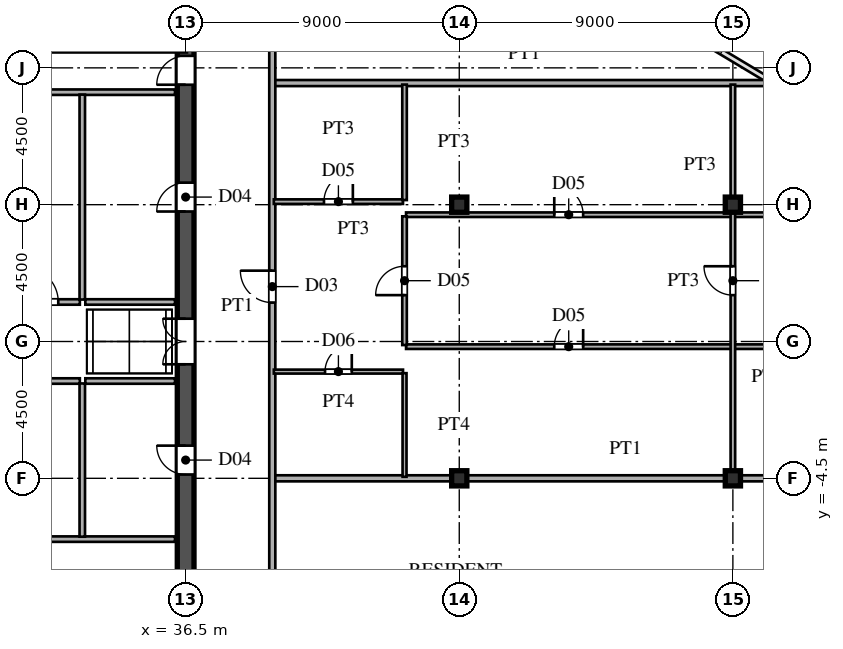
"""IFC4 building model, lengths in metres.
Left out: names, types, materials, properties, quantities, classifications, styles, units other than length and angle.
Written with IfcOpenShell. Run it as: python <this file> out.ifc"""

import sys

from ifc_helpers import new_model, si_unit, direction, frame, frame_2d, origin, origin_2d, place, context, subcontext, project, spatial, rectangle, i_section, extrude, source, transform, mapped, element, fill, save


model = new_model("IFC4")
c1 = context("Model", 3, precision=1e-05, world=origin(), true_north=direction((0.0, 1.0)))
c2 = subcontext(c1, "Body", "Model", "MODEL_VIEW")
j1 = project(units=[si_unit("LENGTHUNIT", "METRE"), si_unit("PLANEANGLEUNIT", "RADIAN")], contexts=[c1])
p1 = place(None, origin())
s1 = spatial("IfcSite", under=j1, at=p1, CompositionType="ELEMENT")
p2 = place(p1, origin())
s2 = spatial("IfcBuilding", under=s1, at=p2, CompositionType="ELEMENT")
p3 = place(p2, frame((0.0, 0.0, 203.1)))
s3 = spatial("IfcBuildingStorey", under=s2, at=p3, CompositionType="ELEMENT", Elevation=203.1)
m1 = source(origin(), c2, "Body", "SweptSolid", [
    extrude(i_section(OverallWidth=0.5, OverallDepth=0.5, WebThickness=0.02, FlangeThickness=0.032, at=origin_2d()), origin(), (0.0, 0.0, 1.0), 3.6),
])
for number, where, z_axis, x_axis in (
    (1, (45.5, -4.5, 0.0), (0.0, 0.0, 1.0), (1.0, 0.0, 0.0)),
    (2, (45.5, 4.5, 0.0), (0.0, 0.0, 1.0), (1.0, 0.0, 0.0)),
    (3, (54.5, -4.5, 0.0), (0.0, 0.0, 1.0), (1.0, 0.0, 0.0)),
    (4, (54.5, 4.5, 0.0), (0.0, 0.0, 1.0), (1.0, 0.0, 0.0)),
):
    element("IfcColumn", number, at=place(p3, frame(where, z_axis=z_axis, x_axis=x_axis)), inside=s3, PredefinedType="COLUMN", context=c2, shape_type="MappedRepresentation", body=[
        mapped(m1, transform((0.0, 0.0, 0.0), scale=1.0)),
    ])
p4 = place(p3, frame((36.5, -13.65, 0.0), z_axis=(0.0, 0.0, 1.0), x_axis=(0.0, 1.0, 0.0)))
e5 = element("IfcWall", 5, at=p4, inside=s3, PredefinedType="SHEAR", context=c2, shape_type="SweptSolid", body=[
    extrude(rectangle(XDim=7.15, YDim=0.55, at=frame_2d((3.575, 0.0))), origin(), (0.0, 0.0, 1.0), 3.38),
])
p5 = place(p4, frame((4.675, 0.0, 0.0)))
e6 = element("IfcOpeningElement", 6, at=p5, cuts=e5, PredefinedType="OPENING", context=c2, shape_type="SweptSolid", body=[
    extrude(rectangle(XDim=1.15, YDim=2.2, at=frame_2d((0.575, 1.1))), frame((0.0, 0.285, 0.0), z_axis=(0.0, -1.0, 0.0), x_axis=(1.0, 0.0, 0.0)), (0.0, 0.0, 1.0), 0.57),
])
p6 = place(p3, frame((36.5, -1.3, 0.0), z_axis=(0.0, 0.0, 1.0), x_axis=(0.0, 1.0, 0.0)))
e7 = element("IfcWall", 7, at=p6, inside=s3, PredefinedType="SHEAR", context=c2, shape_type="SweptSolid", body=[
    extrude(rectangle(XDim=2.6, YDim=0.55, at=frame_2d((1.3, 0.0))), origin(), (0.0, 0.0, 1.0), 3.38),
])
p7 = place(p6, frame((0.55, 0.0, 0.0)))
e8 = element("IfcOpeningElement", 8, at=p7, cuts=e7, PredefinedType="OPENING", context=c2, shape_type="SweptSolid", body=[
    extrude(rectangle(XDim=1.5, YDim=2.3, at=frame_2d((0.75, 1.15))), frame((0.0, 0.285, 0.0), z_axis=(0.0, -1.0, 0.0), x_axis=(1.0, 0.0, 0.0)), (0.0, 0.0, 1.0), 0.57),
])
p8 = place(p3, frame((36.5, 8.2, 0.0), z_axis=(0.0, 0.0, 1.0), x_axis=(0.0, 1.0, 0.0)))
e9 = element("IfcWall", 9, at=p8, inside=s3, PredefinedType="SHEAR", context=c2, shape_type="SweptSolid", body=[
    extrude(rectangle(XDim=5.45, YDim=0.55, at=frame_2d((2.725, 0.0))), origin(), (0.0, 0.0, 1.0), 3.38),
])
p9 = place(p8, frame((0.245, 0.0, 0.0)))
e10 = element("IfcOpeningElement", 10, at=p9, cuts=e9, PredefinedType="OPENING", context=c2, shape_type="SweptSolid", body=[
    extrude(rectangle(XDim=0.95, YDim=2.15, at=frame_2d((0.475, 1.075))), frame((0.0, 0.285, 0.0), z_axis=(0.0, -1.0, 0.0), x_axis=(1.0, 0.0, 0.0)), (0.0, 0.0, 1.0), 0.57),
])
p10 = place(p3, frame((36.5, -6.5, 0.0), z_axis=(0.0, 0.0, 1.0), x_axis=(0.0, 1.0, 0.0)))
e11 = element("IfcWall", 11, at=p10, inside=s3, PredefinedType="SHEAR", context=c2, shape_type="SweptSolid", body=[
    extrude(rectangle(XDim=5.2, YDim=0.55, at=frame_2d((2.6, 0.0))), origin(), (0.0, 0.0, 1.0), 3.38),
])
p11 = place(p10, frame((2.125, 0.0, 0.0)))
e12 = element("IfcOpeningElement", 12, at=p11, cuts=e11, PredefinedType="OPENING", context=c2, shape_type="SweptSolid", body=[
    extrude(rectangle(XDim=0.95, YDim=2.15, at=frame_2d((0.475, 1.075))), frame((0.0, 0.285, 0.0), z_axis=(0.0, -1.0, 0.0), x_axis=(1.0, 0.0, 0.0)), (0.0, 0.0, 1.0), 0.57),
])
p12 = place(p3, frame((36.5, 1.3, 0.0), z_axis=(0.0, 0.0, 1.0), x_axis=(0.0, 1.0, 0.0)))
e13 = element("IfcWall", 13, at=p12, inside=s3, PredefinedType="SHEAR", context=c2, shape_type="SweptSolid", body=[
    extrude(rectangle(XDim=6.9, YDim=0.55, at=frame_2d((3.45, 0.0))), origin(), (0.0, 0.0, 1.0), 3.38),
])
p13 = place(p12, frame((2.975, 0.0, 0.0)))
e14 = element("IfcOpeningElement", 14, at=p13, cuts=e13, PredefinedType="OPENING", context=c2, shape_type="SweptSolid", body=[
    extrude(rectangle(XDim=0.95, YDim=2.15, at=frame_2d((0.475, 1.075))), frame((0.0, 0.285, 0.0), z_axis=(0.0, -1.0, 0.0), x_axis=(1.0, 0.0, 0.0)), (0.0, 0.0, 1.0), 0.57),
])
for number, where, z_axis, x_axis in (
    (15, (30.45, -6.5, 0.0), (0.0, 0.0, 1.0), (1.0, 0.0, 0.0)),
    (16, (30.45, 8.2, 0.0), (0.0, 0.0, 1.0), (1.0, 0.0, 0.0)),
):
    element("IfcWall", number, at=place(p3, frame(where, z_axis=z_axis, x_axis=x_axis)), inside=s3, PredefinedType="PARTITIONING", context=c2, shape_type="SweptSolid", body=[
        extrude(rectangle(XDim=5.7, YDim=0.18, at=frame_2d((2.85, 0.0))), origin(), (0.0, 0.0, 1.0), 3.38),
    ])
p14 = place(p3, frame((33.1, -6.42, 0.0), z_axis=(0.0, 0.0, 1.0), x_axis=(0.0, 1.0, 0.0)))
e17 = element("IfcWall", 17, at=p14, inside=s3, PredefinedType="PARTITIONING", context=c2, shape_type="SweptSolid", body=[
    extrude(rectangle(XDim=5.04, YDim=0.18, at=frame_2d((2.52, 0.0))), origin(), (0.0, 0.0, 1.0), 3.38),
])
p15 = place(p3, frame((33.1, 1.38, 0.0), z_axis=(0.0, 0.0, 1.0), x_axis=(0.0, 1.0, 0.0)))
e18 = element("IfcWall", 18, at=p15, inside=s3, PredefinedType="PARTITIONING", context=c2, shape_type="SweptSolid", body=[
    extrude(rectangle(XDim=6.74, YDim=0.18, at=frame_2d((3.37, 0.0))), origin(), (0.0, 0.0, 1.0), 3.38),
])
p16 = place(p3, frame((27.85, -1.3, 0.0), z_axis=(0.0, 0.0, 1.0), x_axis=(1.0, 0.0, 0.0)))
e19 = element("IfcWall", 19, at=p16, inside=s3, PredefinedType="PARTITIONING", context=c2, shape_type="SweptSolid", body=[
    extrude(rectangle(XDim=5.17, YDim=0.18, at=frame_2d((2.585, 0.0))), origin(), (0.0, 0.0, 1.0), 3.38),
])
p17 = place(p16, frame((2.01, 0.0, 0.0)))
e20 = element("IfcOpeningElement", 20, at=p17, cuts=e19, PredefinedType="OPENING", context=c2, shape_type="SweptSolid", body=[
    extrude(rectangle(XDim=1.15, YDim=2.2, at=frame_2d((0.575, 1.1))), frame((0.0, 0.1, 0.0), z_axis=(0.0, -1.0, 0.0), x_axis=(1.0, 0.0, 0.0)), (0.0, 0.0, 1.0), 0.2),
])
p18 = place(p3, frame((30.45, 1.3, 0.0), z_axis=(0.0, 0.0, 1.0), x_axis=(1.0, 0.0, 0.0)))
e21 = element("IfcWall", 21, at=p18, inside=s3, PredefinedType="PARTITIONING", context=c2, shape_type="SweptSolid", body=[
    extrude(rectangle(XDim=2.57, YDim=0.18, at=frame_2d((1.285, 0.0))), origin(), (0.0, 0.0, 1.0), 3.38),
])
p19 = place(p18, frame((0.71, 0.0, 0.0)))
e22 = element("IfcOpeningElement", 22, at=p19, cuts=e21, PredefinedType="OPENING", context=c2, shape_type="SweptSolid", body=[
    extrude(rectangle(XDim=1.15, YDim=2.2, at=frame_2d((0.575, 1.1))), frame((0.0, 0.1, 0.0), z_axis=(0.0, -1.0, 0.0), x_axis=(1.0, 0.0, 0.0)), (0.0, 0.0, 1.0), 0.2),
])
for number, where, z_axis, x_axis in (
    (23, (33.2, -1.3, 0.0), (0.0, 0.0, 1.0), (1.0, 0.0, 0.0)),
    (24, (33.2, 1.3, 0.0), (0.0, 0.0, 1.0), (1.0, 0.0, 0.0)),
):
    element("IfcWall", number, at=place(p3, frame(where, z_axis=z_axis, x_axis=x_axis)), inside=s3, PredefinedType="PARTITIONING", context=c2, shape_type="SweptSolid", body=[
        extrude(rectangle(XDim=2.95, YDim=0.18, at=frame_2d((1.475, 0.0))), origin(), (0.0, 0.0, 1.0), 3.38),
    ])
p20 = place(p3, frame((39.43, -4.5, 0.0), z_axis=(0.0, 0.0, 1.0), x_axis=(1.0, 0.0, 0.0)))
e25 = element("IfcWall", 25, at=p20, inside=s3, PredefinedType="PARTITIONING", context=c2, shape_type="SweptSolid", body=[
    extrude(rectangle(XDim=15.09, YDim=0.2, at=frame_2d((7.545, 0.0))), origin(), (0.0, 0.0, 1.0), 2.78),
])
p21 = place(p3, frame((54.52, -4.5, 0.0), z_axis=(0.0, 0.0, 1.0), x_axis=(1.0, 0.0, 0.0)))
e26 = element("IfcWall", 26, at=p21, inside=s3, PredefinedType="PARTITIONING", context=c2, shape_type="SweptSolid", body=[
    extrude(rectangle(XDim=7.99, YDim=0.2, at=frame_2d((3.995, 0.0))), origin(), (0.0, 0.0, 1.0), 3.38),
])
p22 = place(p3, frame((39.4, -0.99, 0.0), z_axis=(0.0, 0.0, 1.0), x_axis=(1.0, 0.0, 0.0)))
e27 = element("IfcWall", 27, at=p22, inside=s3, PredefinedType="PARTITIONING", context=c2, shape_type="SweptSolid", body=[
    extrude(rectangle(XDim=4.25, YDim=0.13, at=frame_2d((2.125, 0.0))), origin(), (0.0, 0.0, 1.0), 3.38),
])
p23 = place(p22, frame((1.685, 0.0, 0.0)))
e28 = element("IfcOpeningElement", 28, at=p23, cuts=e27, PredefinedType="OPENING", context=c2, shape_type="SweptSolid", body=[
    extrude(rectangle(XDim=0.88, YDim=2.1, at=frame_2d((0.44, 1.05))), frame((0.0, 0.075, 0.0), z_axis=(0.0, -1.0, 0.0), x_axis=(1.0, 0.0, 0.0)), (0.0, 0.0, 1.0), 0.15),
])
p24 = place(p3, frame((43.75, -0.17, 0.0), z_axis=(0.0, 0.0, 1.0), x_axis=(1.0, 0.0, 0.0)))
e29 = element("IfcWall", 29, at=p24, inside=s3, PredefinedType="PARTITIONING", context=c2, shape_type="SweptSolid", body=[
    extrude(rectangle(XDim=23.785, YDim=0.15, at=frame_2d((11.893, 0.0))), origin(), (0.0, 0.0, 1.0), 3.38),
])
p25 = place(p24, frame((4.875, 0.0, 0.0)))
e30 = element("IfcOpeningElement", 30, at=p25, cuts=e29, PredefinedType="OPENING", context=c2, shape_type="SweptSolid", body=[
    extrude(rectangle(XDim=0.95, YDim=2.15, at=frame_2d((0.475, 1.075))), frame((0.0, 0.085, 0.0), z_axis=(0.0, -1.0, 0.0), x_axis=(1.0, 0.0, 0.0)), (0.0, 0.0, 1.0), 0.17),
])
p26 = place(p24, frame((16.775, 0.0, 0.0)))
e31 = element("IfcOpeningElement", 31, at=p26, cuts=e29, PredefinedType="OPENING", context=c2, shape_type="SweptSolid", body=[
    extrude(rectangle(XDim=0.95, YDim=2.15, at=frame_2d((0.475, 1.075))), frame((0.0, 0.085, 0.0), z_axis=(0.0, -1.0, 0.0), x_axis=(1.0, 0.0, 0.0)), (0.0, 0.0, 1.0), 0.17),
])
p27 = place(p3, frame((43.75, 4.17, 0.0), z_axis=(0.0, 0.0, 1.0), x_axis=(1.0, 0.0, 0.0)))
e32 = element("IfcWall", 32, at=p27, inside=s3, PredefinedType="PARTITIONING", context=c2, shape_type="SweptSolid", body=[
    extrude(rectangle(XDim=19.34, YDim=0.15, at=frame_2d((9.67, 0.0))), origin(), (0.0, 0.0, 1.0), 3.38),
])
p28 = place(p27, frame((4.875, 0.0, 0.0)))
e33 = element("IfcOpeningElement", 33, at=p28, cuts=e32, PredefinedType="OPENING", context=c2, shape_type="SweptSolid", body=[
    extrude(rectangle(XDim=0.95, YDim=2.15, at=frame_2d((0.475, 1.075))), frame((0.0, 0.085, 0.0), z_axis=(0.0, -1.0, 0.0), x_axis=(1.0, 0.0, 0.0)), (0.0, 0.0, 1.0), 0.17),
])
p29 = place(p27, frame((14.553, 0.0, 0.0)))
e34 = element("IfcOpeningElement", 34, at=p29, cuts=e32, PredefinedType="OPENING", context=c2, shape_type="SweptSolid", body=[
    extrude(rectangle(XDim=0.95, YDim=2.15, at=frame_2d((0.475, 1.075))), frame((0.0, 0.085, 0.0), z_axis=(0.0, -1.0, 0.0), x_axis=(1.0, 0.0, 0.0)), (0.0, 0.0, 1.0), 0.17),
])
p30 = place(p3, frame((39.4, 4.6, 0.0), z_axis=(0.0, 0.0, 1.0), x_axis=(1.0, 0.0, 0.0)))
e35 = element("IfcWall", 35, at=p30, inside=s3, PredefinedType="PARTITIONING", context=c2, shape_type="SweptSolid", body=[
    extrude(rectangle(XDim=4.25, YDim=0.15, at=frame_2d((2.125, 0.0))), origin(), (0.0, 0.0, 1.0), 2.78),
])
p31 = place(p30, frame((1.65, 0.0, 0.0)))
e36 = element("IfcOpeningElement", 36, at=p31, cuts=e35, PredefinedType="OPENING", context=c2, shape_type="SweptSolid", body=[
    extrude(rectangle(XDim=0.95, YDim=2.15, at=frame_2d((0.475, 1.075))), frame((0.0, 0.085, 0.0), z_axis=(0.0, -1.0, 0.0), x_axis=(1.0, 0.0, 0.0)), (0.0, 0.0, 1.0), 0.17),
])
p32 = place(p3, frame((39.43, 8.5, 0.0), z_axis=(0.0, 0.0, 1.0), x_axis=(1.0, 0.0, 0.0)))
e37 = element("IfcWall", 37, at=p32, inside=s3, PredefinedType="PARTITIONING", context=c2, shape_type="SweptSolid", body=[
    extrude(rectangle(XDim=16.413, YDim=0.2, at=frame_2d((8.207, 0.0))), origin(), (0.0, 0.0, 1.0), 3.38),
])
p33 = place(p3, frame((39.35, -15.715, 0.0), z_axis=(0.0, 0.0, 1.0), x_axis=(0.0, 1.0, 0.0)))
e38 = element("IfcWall", 38, at=p33, inside=s3, PredefinedType="PARTITIONING", context=c2, shape_type="SweptSolid", body=[
    extrude(rectangle(XDim=31.43, YDim=0.2, at=frame_2d((15.715, 0.0))), origin(), (0.0, 0.0, 1.0), 3.38),
])
p34 = place(p33, frame((5.04, 0.0, 0.0)))
e39 = element("IfcOpeningElement", 39, at=p34, cuts=e38, PredefinedType="OPENING", context=c2, shape_type="SweptSolid", body=[
    extrude(rectangle(XDim=1.05, YDim=2.25, at=frame_2d((0.525, 1.125))), frame((0.0, 0.11, 0.0), z_axis=(0.0, -1.0, 0.0), x_axis=(1.0, 0.0, 0.0)), (0.0, 0.0, 1.0), 0.22),
])
p35 = place(p33, frame((16.995, 0.0, 0.0)))
e40 = element("IfcOpeningElement", 40, at=p35, cuts=e38, PredefinedType="OPENING", context=c2, shape_type="SweptSolid", body=[
    extrude(rectangle(XDim=1.05, YDim=2.25, at=frame_2d((0.525, 1.125))), frame((0.0, 0.11, 0.0), z_axis=(0.0, -1.0, 0.0), x_axis=(1.0, 0.0, 0.0)), (0.0, 0.0, 1.0), 0.22),
])
p36 = place(p33, frame((27.34, 0.0, 0.0)))
e41 = element("IfcOpeningElement", 41, at=p36, cuts=e38, PredefinedType="OPENING", context=c2, shape_type="SweptSolid", body=[
    extrude(rectangle(XDim=1.05, YDim=2.25, at=frame_2d((0.525, 1.125))), frame((0.0, 0.11, 0.0), z_axis=(0.0, -1.0, 0.0), x_axis=(1.0, 0.0, 0.0)), (0.0, 0.0, 1.0), 0.22),
])
p37 = place(p3, frame((43.7, -4.45, 0.0), z_axis=(0.0, 0.0, 1.0), x_axis=(0.0, 1.0, 0.0)))
e42 = element("IfcWall", 42, at=p37, inside=s3, PredefinedType="PARTITIONING", context=c2, shape_type="SweptSolid", body=[
    extrude(rectangle(XDim=3.408, YDim=0.13, at=frame_2d((1.704, 0.0))), origin(), (0.0, 0.0, 1.0), 3.38),
])
p38 = place(p3, frame((43.7, -0.117, 0.0), z_axis=(0.0, 0.0, 1.0), x_axis=(0.0, 1.0, 0.0)))
e43 = element("IfcWall", 43, at=p38, inside=s3, PredefinedType="PARTITIONING", context=c2, shape_type="SweptSolid", body=[
    extrude(rectangle(XDim=4.234, YDim=0.15, at=frame_2d((2.117, 0.0))), origin(), (0.0, 0.0, 1.0), 3.38),
])
p39 = place(p38, frame((1.642, 0.0, 0.0)))
e44 = element("IfcOpeningElement", 44, at=p39, cuts=e43, PredefinedType="OPENING", context=c2, shape_type="SweptSolid", body=[
    extrude(rectangle(XDim=0.95, YDim=2.15, at=frame_2d((0.475, 1.075))), frame((0.0, 0.085, 0.0), z_axis=(0.0, -1.0, 0.0), x_axis=(1.0, 0.0, 0.0)), (0.0, 0.0, 1.0), 0.17),
])
p40 = place(p3, frame((43.7, 4.652, 0.0), z_axis=(0.0, 0.0, 1.0), x_axis=(0.0, 1.0, 0.0)))
e45 = element("IfcWall", 45, at=p40, inside=s3, PredefinedType="PARTITIONING", context=c2, shape_type="SweptSolid", body=[
    extrude(rectangle(XDim=3.798, YDim=0.15, at=frame_2d((1.899, 0.0))), origin(), (0.0, 0.0, 1.0), 3.38),
])
p41 = place(p3, frame((54.5, -4.45, 0.0), z_axis=(0.0, 0.0, 1.0), x_axis=(0.0, 1.0, 0.0)))
e46 = element("IfcWall", 46, at=p41, inside=s3, PredefinedType="PARTITIONING", context=c2, shape_type="SweptSolid", body=[
    extrude(rectangle(XDim=12.9, YDim=0.15, at=frame_2d((6.45, 0.0))), origin(), (0.0, 0.0, 1.0), 2.78),
])
p42 = place(p41, frame((5.975, 0.0, 0.0)))
e47 = element("IfcOpeningElement", 47, at=p42, cuts=e46, PredefinedType="OPENING", context=c2, shape_type="SweptSolid", body=[
    extrude(rectangle(XDim=0.95, YDim=2.15, at=frame_2d((0.475, 1.075))), frame((0.0, 0.085, 0.0), z_axis=(0.0, -1.0, 0.0), x_axis=(1.0, 0.0, 0.0)), (0.0, 0.0, 1.0), 0.17),
])
m2 = source(origin(), c2, "Body", "SweptSolid", [
    extrude(rectangle(XDim=1.5, YDim=2.3, at=frame_2d((0.75, 1.15))), frame((0.0, 0.025, 0.0), z_axis=(0.0, -1.0, 0.0), x_axis=(1.0, 0.0, 0.0)), (0.0, 0.0, 1.0), 0.05),
])
p43 = place(p7, origin())
e48 = element("IfcDoor", 48, at=p43, inside=s3, OperationType="DOUBLE_SWING_LEFT", PredefinedType="DOOR", context=c2, shape_type="MappedRepresentation", body=[
    mapped(m2, transform((0.0, 0.0, 0.0), scale=1.0)),
])
fill(e8, e48)
m3 = source(origin(), c2, "Body", "SweptSolid", [
    extrude(rectangle(XDim=0.95, YDim=2.15, at=frame_2d((0.475, 1.075))), frame((0.0, 0.025, 0.0), z_axis=(0.0, -1.0, 0.0), x_axis=(1.0, 0.0, 0.0)), (0.0, 0.0, 1.0), 0.05),
])
p44 = place(p9, origin())
e49 = element("IfcDoor", 49, at=p44, inside=s3, OperationType="SINGLE_SWING_LEFT", PredefinedType="DOOR", context=c2, shape_type="MappedRepresentation", body=[
    mapped(m3, transform((0.0, 0.0, 0.0), scale=1.0)),
])
fill(e10, e49)
p45 = place(p11, origin())
e50 = element("IfcDoor", 50, at=p45, inside=s3, OperationType="SINGLE_SWING_RIGHT", PredefinedType="DOOR", context=c2, shape_type="MappedRepresentation", body=[
    mapped(m3, transform((0.0, 0.0, 0.0), scale=1.0)),
])
fill(e12, e50)
p46 = place(p13, origin())
e51 = element("IfcDoor", 51, at=p46, inside=s3, OperationType="SINGLE_SWING_LEFT", PredefinedType="DOOR", context=c2, shape_type="MappedRepresentation", body=[
    mapped(m3, transform((0.0, 0.0, 0.0), scale=1.0)),
])
fill(e14, e51)
m4 = source(origin(), c2, "Body", "SweptSolid", [
    extrude(rectangle(XDim=1.15, YDim=2.2, at=frame_2d((0.575, 1.1))), frame((0.0, 0.025, 0.0), z_axis=(0.0, -1.0, 0.0), x_axis=(1.0, 0.0, 0.0)), (0.0, 0.0, 1.0), 0.05),
])
p47 = place(p19, origin())
e52 = element("IfcDoor", 52, at=p47, inside=s3, OperationType="SINGLE_SWING_LEFT", PredefinedType="DOOR", context=c2, shape_type="MappedRepresentation", body=[
    mapped(m4, transform((0.0, 0.0, 0.0), scale=1.0)),
])
fill(e22, e52)
m5 = source(origin(), c2, "Body", "SweptSolid", [
    extrude(rectangle(XDim=0.88, YDim=2.1, at=frame_2d((0.44, 1.05))), frame((0.0, 0.025, 0.0), z_axis=(0.0, -1.0, 0.0), x_axis=(1.0, 0.0, 0.0)), (0.0, 0.0, 1.0), 0.05),
])
p48 = place(p23, origin())
e53 = element("IfcDoor", 53, at=p48, inside=s3, OperationType="SINGLE_SWING_RIGHT", PredefinedType="DOOR", context=c2, shape_type="MappedRepresentation", body=[
    mapped(m5, transform((0.0, 0.0, 0.0), scale=1.0)),
])
fill(e28, e53)
m6 = source(origin(), c2, "Body", "SweptSolid", [
    extrude(rectangle(XDim=0.95, YDim=2.15, at=frame_2d((0.475, 1.075))), frame((0.0, 0.025, 0.0), z_axis=(0.0, -1.0, 0.0), x_axis=(1.0, 0.0, 0.0)), (0.0, 0.0, 1.0), 0.05),
])
p49 = place(p25, origin())
e54 = element("IfcDoor", 54, at=p49, inside=s3, OperationType="SINGLE_SWING_RIGHT", PredefinedType="DOOR", context=c2, shape_type="MappedRepresentation", body=[
    mapped(m6, transform((0.0, 0.0, 0.0), scale=1.0)),
])
fill(e30, e54)
p50 = place(p28, origin())
e55 = element("IfcDoor", 55, at=p50, inside=s3, OperationType="SINGLE_SWING_LEFT", PredefinedType="DOOR", context=c2, shape_type="MappedRepresentation", body=[
    mapped(m6, transform((0.0, 0.0, 0.0), scale=1.0)),
])
fill(e33, e55)
p51 = place(p31, origin())
e56 = element("IfcDoor", 56, at=p51, inside=s3, OperationType="SINGLE_SWING_RIGHT", PredefinedType="DOOR", context=c2, shape_type="MappedRepresentation", body=[
    mapped(m6, transform((0.0, 0.0, 0.0), scale=1.0)),
])
fill(e36, e56)
m7 = source(origin(), c2, "Body", "SweptSolid", [
    extrude(rectangle(XDim=1.05, YDim=2.25, at=frame_2d((0.525, 1.125))), frame((0.0, 0.025, 0.0), z_axis=(0.0, -1.0, 0.0), x_axis=(1.0, 0.0, 0.0)), (0.0, 0.0, 1.0), 0.05),
])
p52 = place(p35, origin())
e57 = element("IfcDoor", 57, at=p52, inside=s3, OperationType="SINGLE_SWING_RIGHT", PredefinedType="DOOR", context=c2, shape_type="MappedRepresentation", body=[
    mapped(m7, transform((0.0, 0.0, 0.0), scale=1.0)),
])
fill(e40, e57)
p53 = place(p39, origin())
e58 = element("IfcDoor", 58, at=p53, inside=s3, OperationType="SINGLE_SWING_LEFT", PredefinedType="DOOR", context=c2, shape_type="MappedRepresentation", body=[
    mapped(m6, transform((0.0, 0.0, 0.0), scale=1.0)),
])
fill(e44, e58)
p54 = place(p42, origin())
e59 = element("IfcDoor", 59, at=p54, inside=s3, OperationType="SINGLE_SWING_RIGHT", PredefinedType="DOOR", context=c2, shape_type="MappedRepresentation", body=[
    mapped(m6, transform((0.0, 0.0, 0.0), scale=1.0)),
])
fill(e47, e59)
save(model, sys.argv[1])
